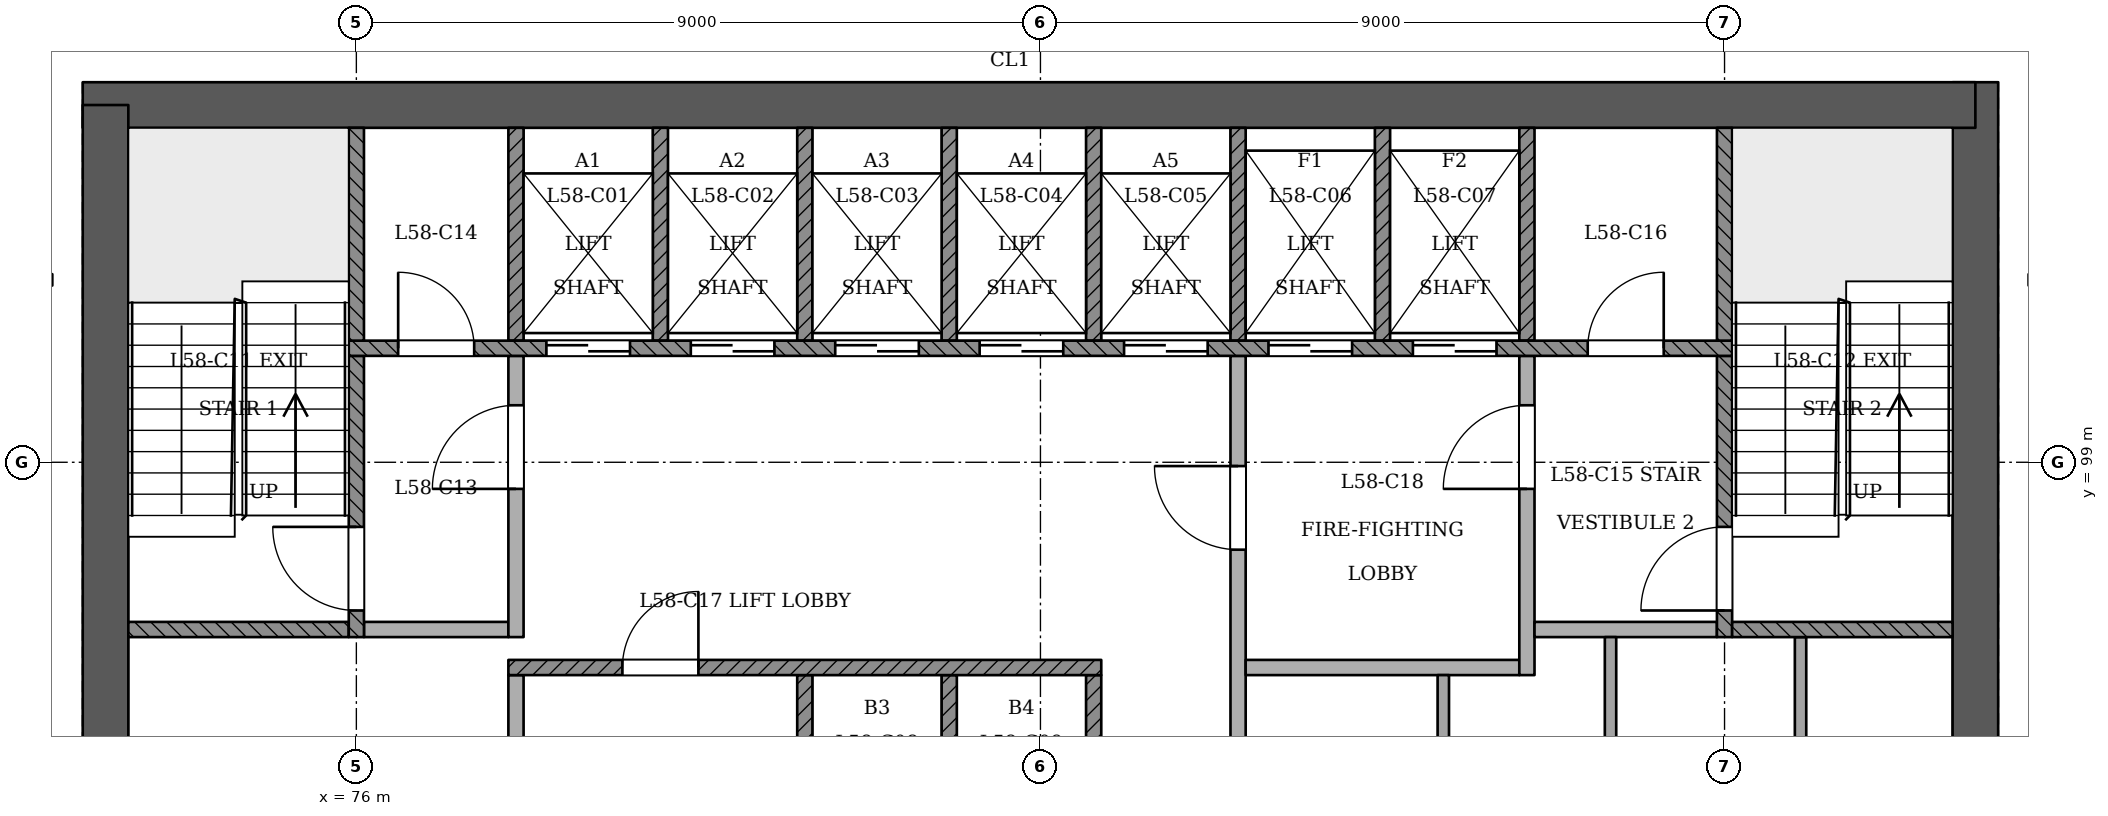
"""IFC4 building model, lengths in metres.
Left out: names, types, materials, properties, quantities, classifications, styles, units other than length and angle.
Written with IfcOpenShell. Run it as: python <this file> out.ifc"""

import sys

from ifc_helpers import new_model, si_unit, direction, frame, frame_2d, origin, place, context, subcontext, project, spatial, rectangle, extrude, element, fill, save


model = new_model("IFC4")
c1 = context("Model", 3, precision=1e-05, world=origin(), true_north=direction((0.0, 1.0)))
c2 = subcontext(c1, "Body", "Model", "MODEL_VIEW")
j1 = project(units=[si_unit("LENGTHUNIT", "METRE"), si_unit("PLANEANGLEUNIT", "RADIAN")], contexts=[c1])
p1 = place(None, origin())
s1 = spatial("IfcSite", under=j1, at=p1, CompositionType="ELEMENT")
p2 = place(p1, origin())
s2 = spatial("IfcBuilding", under=s1, at=p2, CompositionType="ELEMENT")
p3 = place(p2, frame((0.0, 0.0, 226.6)))
s3 = spatial("IfcBuildingStorey", under=s2, at=p3, CompositionType="ELEMENT", Elevation=226.6)
p4 = place(p3, frame((97.3, 93.1, 0.0), z_axis=(0.0, 0.0, 1.0), x_axis=(0.0, 1.0, 0.0)))
e1 = element("IfcWall", 1, at=p4, inside=s3, PredefinedType="SHEAR", context=c2, shape_type="SweptSolid", body=[
    extrude(rectangle(XDim=10.9, YDim=0.6, at=frame_2d((5.45, 0.0))), origin(), (0.0, 0.0, 1.0), 3.6),
])
p5 = place(p3, frame((97.3, 103.7, 0.0), z_axis=(0.0, 0.0, 1.0), x_axis=(-1.0, 0.0, 0.0)))
e2 = element("IfcWall", 2, at=p5, inside=s3, PredefinedType="SHEAR", context=c2, shape_type="SweptSolid", body=[
    extrude(rectangle(XDim=24.9, YDim=0.6, at=frame_2d((12.45, 0.0))), origin(), (0.0, 0.0, 1.0), 3.6),
])
p6 = place(p3, frame((72.7, 103.7, 0.0), z_axis=(0.0, 0.0, 1.0), x_axis=(0.0, -1.0, 0.0)))
e3 = element("IfcWall", 3, at=p6, inside=s3, PredefinedType="SHEAR", context=c2, shape_type="SweptSolid", body=[
    extrude(rectangle(XDim=10.9, YDim=0.6, at=frame_2d((5.45, 0.0))), origin(), (0.0, 0.0, 1.0), 3.6),
])
p7 = place(p3, frame((72.0, 101.4, 0.0), z_axis=(0.0, 0.0, 1.0), x_axis=(-1.0, 0.0, 0.0)))
e4 = element("IfcWall", 4, at=p7, inside=s3, PredefinedType="PARTITIONING", context=c2, shape_type="SweptSolid", body=[
    extrude(rectangle(XDim=1.8, YDim=0.15, at=frame_2d((0.9, 0.0))), origin(), (0.0, 0.0, 1.0), 3.2),
])
p8 = place(p3, frame((78.1, 93.4, 0.0), z_axis=(0.0, 0.0, 1.0), x_axis=(0.0, 1.0, 0.0)))
e5 = element("IfcWall", 5, at=p8, inside=s3, PredefinedType="PARTITIONING", context=c2, shape_type="SweptSolid", body=[
    extrude(rectangle(XDim=2.8, YDim=0.2, at=frame_2d((1.4, 0.0))), origin(), (0.0, 0.0, 1.0), 3.2),
])
for number, where, z_axis, x_axis in (
    (6, (81.9, 93.4, 0.0), (0.0, 0.0, 1.0), (0.0, 1.0, 0.0)),
    (7, (83.8, 93.4, 0.0), (0.0, 0.0, 1.0), (0.0, 1.0, 0.0)),
    (8, (85.7, 93.4, 0.0), (0.0, 0.0, 1.0), (0.0, 1.0, 0.0)),
):
    element("IfcWall", number, at=place(p3, frame(where, z_axis=z_axis, x_axis=x_axis)), inside=s3, PredefinedType="SOLIDWALL", context=c2, shape_type="SweptSolid", body=[
        extrude(rectangle(XDim=2.8, YDim=0.2, at=frame_2d((1.4, 0.0))), origin(), (0.0, 0.0, 1.0), 3.2),
    ])
p9 = place(p3, frame((87.6, 93.4, 0.0), z_axis=(0.0, 0.0, 1.0), x_axis=(0.0, 1.0, 0.0)))
e9 = element("IfcWall", 9, at=p9, inside=s3, PredefinedType="PARTITIONING", context=c2, shape_type="SweptSolid", body=[
    extrude(rectangle(XDim=7.0, YDim=0.2, at=frame_2d((3.5, 0.0))), origin(), (0.0, 0.0, 1.0), 3.2),
])
p10 = place(p9, frame((4.45, 0.0, 0.0)))
e10 = element("IfcOpeningElement", 10, at=p10, cuts=e9, PredefinedType="OPENING", context=c2, shape_type="SweptSolid", body=[
    extrude(rectangle(XDim=1.1, YDim=2.1, at=frame_2d((0.55, 1.05))), frame((0.0, 0.11, 0.0), z_axis=(0.0, -1.0, 0.0), x_axis=(1.0, 0.0, 0.0)), (0.0, 0.0, 1.0), 0.221),
])
p11 = place(p3, frame((90.3, 93.4, 0.0), z_axis=(0.0, 0.0, 1.0), x_axis=(0.0, 1.0, 0.0)))
e11 = element("IfcWall", 11, at=p11, inside=s3, PredefinedType="PARTITIONING", context=c2, shape_type="SweptSolid", body=[
    extrude(rectangle(XDim=2.8, YDim=0.15, at=frame_2d((1.4, 0.0))), origin(), (0.0, 0.0, 1.0), 3.2),
])
for number, where, z_axis, x_axis in (
    (12, (92.5, 93.4, 0.0), (0.0, 0.0, 1.0), (0.0, 1.0, 0.0)),
    (13, (95.0, 93.4, 0.0), (0.0, 0.0, 1.0), (0.0, 1.0, 0.0)),
):
    element("IfcWall", number, at=place(p3, frame(where, z_axis=z_axis, x_axis=x_axis)), inside=s3, PredefinedType="PARTITIONING", context=c2, shape_type="SweptSolid", body=[
        extrude(rectangle(XDim=3.3, YDim=0.15, at=frame_2d((1.65, 0.0))), origin(), (0.0, 0.0, 1.0), 3.2),
    ])
p12 = place(p3, frame((78.0, 96.3, 0.0), z_axis=(0.0, 0.0, 1.0), x_axis=(1.0, 0.0, 0.0)))
e14 = element("IfcWall", 14, at=p12, inside=s3, PredefinedType="SOLIDWALL", context=c2, shape_type="SweptSolid", body=[
    extrude(rectangle(XDim=7.8, YDim=0.2, at=frame_2d((3.9, 0.0))), origin(), (0.0, 0.0, 1.0), 3.2),
])
p13 = place(p12, frame((1.5, 0.0, 0.0)))
e15 = element("IfcOpeningElement", 15, at=p13, cuts=e14, PredefinedType="OPENING", context=c2, shape_type="SweptSolid", body=[
    extrude(rectangle(XDim=1.0, YDim=2.1, at=frame_2d((0.5, 1.05))), frame((0.0, 0.11, 0.0), z_axis=(0.0, -1.0, 0.0), x_axis=(1.0, 0.0, 0.0)), (0.0, 0.0, 1.0), 0.221),
])
p14 = place(p3, frame((87.7, 96.3, 0.0), z_axis=(0.0, 0.0, 1.0), x_axis=(1.0, 0.0, 0.0)))
e16 = element("IfcWall", 16, at=p14, inside=s3, PredefinedType="PARTITIONING", context=c2, shape_type="SweptSolid", body=[
    extrude(rectangle(XDim=3.6, YDim=0.2, at=frame_2d((1.8, 0.0))), origin(), (0.0, 0.0, 1.0), 3.2),
])
p15 = place(p3, frame((91.4, 96.2, 0.0), z_axis=(0.0, 0.0, 1.0), x_axis=(0.0, 1.0, 0.0)))
e17 = element("IfcWall", 17, at=p15, inside=s3, PredefinedType="PARTITIONING", context=c2, shape_type="SweptSolid", body=[
    extrude(rectangle(XDim=4.2, YDim=0.2, at=frame_2d((2.1, 0.0))), origin(), (0.0, 0.0, 1.0), 3.2),
])
p16 = place(p15, frame((2.45, 0.0, 0.0)))
e18 = element("IfcOpeningElement", 18, at=p16, cuts=e17, PredefinedType="OPENING", context=c2, shape_type="SweptSolid", body=[
    extrude(rectangle(XDim=1.1, YDim=2.1, at=frame_2d((0.55, 1.05))), frame((0.0, 0.11, 0.0), z_axis=(0.0, -1.0, 0.0), x_axis=(1.0, 0.0, 0.0)), (0.0, 0.0, 1.0), 0.221),
])
p17 = place(p3, frame((73.0, 96.8, 0.0), z_axis=(0.0, 0.0, 1.0), x_axis=(1.0, 0.0, 0.0)))
e19 = element("IfcWall", 19, at=p17, inside=s3, PredefinedType="SOLIDWALL", context=c2, shape_type="SweptSolid", body=[
    extrude(rectangle(XDim=2.9, YDim=0.2, at=frame_2d((1.45, 0.0))), origin(), (0.0, 0.0, 1.0), 3.2),
])
p18 = place(p3, frame((76.0, 96.7, 0.0), z_axis=(0.0, 0.0, 1.0), x_axis=(0.0, 1.0, 0.0)))
e20 = element("IfcWall", 20, at=p18, inside=s3, PredefinedType="SOLIDWALL", context=c2, shape_type="SweptSolid", body=[
    extrude(rectangle(XDim=3.7, YDim=0.2, at=frame_2d((1.85, 0.0))), origin(), (0.0, 0.0, 1.0), 3.2),
])
p19 = place(p18, frame((0.35, 0.0, 0.0)))
e21 = element("IfcOpeningElement", 21, at=p19, cuts=e20, PredefinedType="OPENING", context=c2, shape_type="SweptSolid", body=[
    extrude(rectangle(XDim=1.1, YDim=2.1, at=frame_2d((0.55, 1.05))), frame((0.0, 0.11, 0.0), z_axis=(0.0, -1.0, 0.0), x_axis=(1.0, 0.0, 0.0)), (0.0, 0.0, 1.0), 0.221),
])
p20 = place(p3, frame((76.1, 96.8, 0.0), z_axis=(0.0, 0.0, 1.0), x_axis=(1.0, 0.0, 0.0)))
e22 = element("IfcWall", 22, at=p20, inside=s3, PredefinedType="PARTITIONING", context=c2, shape_type="SweptSolid", body=[
    extrude(rectangle(XDim=1.9, YDim=0.2, at=frame_2d((0.95, 0.0))), origin(), (0.0, 0.0, 1.0), 3.2),
])
p21 = place(p3, frame((78.1, 96.7, 0.0), z_axis=(0.0, 0.0, 1.0), x_axis=(0.0, 1.0, 0.0)))
e23 = element("IfcWall", 23, at=p21, inside=s3, PredefinedType="PARTITIONING", context=c2, shape_type="SweptSolid", body=[
    extrude(rectangle(XDim=3.7, YDim=0.2, at=frame_2d((1.85, 0.0))), origin(), (0.0, 0.0, 1.0), 3.2),
])
p22 = place(p21, frame((1.95, 0.0, 0.0)))
e24 = element("IfcOpeningElement", 24, at=p22, cuts=e23, PredefinedType="OPENING", context=c2, shape_type="SweptSolid", body=[
    extrude(rectangle(XDim=1.1, YDim=2.1, at=frame_2d((0.55, 1.05))), frame((0.0, 0.11, 0.0), z_axis=(0.0, -1.0, 0.0), x_axis=(1.0, 0.0, 0.0)), (0.0, 0.0, 1.0), 0.221),
])
p23 = place(p3, frame((91.5, 96.8, 0.0), z_axis=(0.0, 0.0, 1.0), x_axis=(1.0, 0.0, 0.0)))
e25 = element("IfcWall", 25, at=p23, inside=s3, PredefinedType="PARTITIONING", context=c2, shape_type="SweptSolid", body=[
    extrude(rectangle(XDim=2.4, YDim=0.2, at=frame_2d((1.2, 0.0))), origin(), (0.0, 0.0, 1.0), 3.2),
])
p24 = place(p3, frame((94.0, 96.7, 0.0), z_axis=(0.0, 0.0, 1.0), x_axis=(0.0, 1.0, 0.0)))
e26 = element("IfcWall", 26, at=p24, inside=s3, PredefinedType="SOLIDWALL", context=c2, shape_type="SweptSolid", body=[
    extrude(rectangle(XDim=3.7, YDim=0.2, at=frame_2d((1.85, 0.0))), origin(), (0.0, 0.0, 1.0), 3.2),
])
p25 = place(p24, frame((0.35, 0.0, 0.0)))
e27 = element("IfcOpeningElement", 27, at=p25, cuts=e26, PredefinedType="OPENING", context=c2, shape_type="SweptSolid", body=[
    extrude(rectangle(XDim=1.1, YDim=2.1, at=frame_2d((0.55, 1.05))), frame((0.0, 0.11, 0.0), z_axis=(0.0, -1.0, 0.0), x_axis=(1.0, 0.0, 0.0)), (0.0, 0.0, 1.0), 0.221),
])
p26 = place(p3, frame((94.1, 96.8, 0.0), z_axis=(0.0, 0.0, 1.0), x_axis=(1.0, 0.0, 0.0)))
e28 = element("IfcWall", 28, at=p26, inside=s3, PredefinedType="SOLIDWALL", context=c2, shape_type="SweptSolid", body=[
    extrude(rectangle(XDim=2.9, YDim=0.2, at=frame_2d((1.45, 0.0))), origin(), (0.0, 0.0, 1.0), 3.2),
])
p27 = place(p3, frame((75.9, 100.5, 0.0), z_axis=(0.0, 0.0, 1.0), x_axis=(1.0, 0.0, 0.0)))
e29 = element("IfcWall", 29, at=p27, inside=s3, PredefinedType="SOLIDWALL", context=c2, shape_type="SweptSolid", body=[
    extrude(rectangle(XDim=18.2, YDim=0.2, at=frame_2d((9.1, 0.0))), origin(), (0.0, 0.0, 1.0), 3.2),
])
p28 = place(p27, frame((2.6, 0.0, 0.0)))
e30 = element("IfcOpeningElement", 30, at=p28, cuts=e29, PredefinedType="OPENING", context=c2, shape_type="SweptSolid", body=[
    extrude(rectangle(XDim=1.1, YDim=2.1, at=frame_2d((0.55, 1.05))), frame((0.0, 0.11, 0.0), z_axis=(0.0, -1.0, 0.0), x_axis=(1.0, 0.0, 0.0)), (0.0, 0.0, 1.0), 0.221),
])
p29 = place(p27, frame((4.5, 0.0, 0.0)))
e31 = element("IfcOpeningElement", 31, at=p29, cuts=e29, PredefinedType="OPENING", context=c2, shape_type="SweptSolid", body=[
    extrude(rectangle(XDim=1.1, YDim=2.1, at=frame_2d((0.55, 1.05))), frame((0.0, 0.11, 0.0), z_axis=(0.0, -1.0, 0.0), x_axis=(1.0, 0.0, 0.0)), (0.0, 0.0, 1.0), 0.221),
])
p30 = place(p27, frame((6.4, 0.0, 0.0)))
e32 = element("IfcOpeningElement", 32, at=p30, cuts=e29, PredefinedType="OPENING", context=c2, shape_type="SweptSolid", body=[
    extrude(rectangle(XDim=1.1, YDim=2.1, at=frame_2d((0.55, 1.05))), frame((0.0, 0.11, 0.0), z_axis=(0.0, -1.0, 0.0), x_axis=(1.0, 0.0, 0.0)), (0.0, 0.0, 1.0), 0.221),
])
p31 = place(p27, frame((8.3, 0.0, 0.0)))
e33 = element("IfcOpeningElement", 33, at=p31, cuts=e29, PredefinedType="OPENING", context=c2, shape_type="SweptSolid", body=[
    extrude(rectangle(XDim=1.1, YDim=2.1, at=frame_2d((0.55, 1.05))), frame((0.0, 0.11, 0.0), z_axis=(0.0, -1.0, 0.0), x_axis=(1.0, 0.0, 0.0)), (0.0, 0.0, 1.0), 0.221),
])
p32 = place(p27, frame((10.2, 0.0, 0.0)))
e34 = element("IfcOpeningElement", 34, at=p32, cuts=e29, PredefinedType="OPENING", context=c2, shape_type="SweptSolid", body=[
    extrude(rectangle(XDim=1.1, YDim=2.1, at=frame_2d((0.55, 1.05))), frame((0.0, 0.11, 0.0), z_axis=(0.0, -1.0, 0.0), x_axis=(1.0, 0.0, 0.0)), (0.0, 0.0, 1.0), 0.221),
])
p33 = place(p27, frame((12.1, 0.0, 0.0)))
e35 = element("IfcOpeningElement", 35, at=p33, cuts=e29, PredefinedType="OPENING", context=c2, shape_type="SweptSolid", body=[
    extrude(rectangle(XDim=1.1, YDim=2.1, at=frame_2d((0.55, 1.05))), frame((0.0, 0.11, 0.0), z_axis=(0.0, -1.0, 0.0), x_axis=(1.0, 0.0, 0.0)), (0.0, 0.0, 1.0), 0.221),
])
p34 = place(p27, frame((14.0, 0.0, 0.0)))
e36 = element("IfcOpeningElement", 36, at=p34, cuts=e29, PredefinedType="OPENING", context=c2, shape_type="SweptSolid", body=[
    extrude(rectangle(XDim=1.1, YDim=2.1, at=frame_2d((0.55, 1.05))), frame((0.0, 0.11, 0.0), z_axis=(0.0, -1.0, 0.0), x_axis=(1.0, 0.0, 0.0)), (0.0, 0.0, 1.0), 0.221),
])
p35 = place(p27, frame((0.65, 0.0, 0.0)))
e37 = element("IfcOpeningElement", 37, at=p35, cuts=e29, PredefinedType="OPENING", context=c2, shape_type="SweptSolid", body=[
    extrude(rectangle(XDim=1.0, YDim=2.1, at=frame_2d((0.5, 1.05))), frame((0.0, 0.11, 0.0), z_axis=(0.0, -1.0, 0.0), x_axis=(1.0, 0.0, 0.0)), (0.0, 0.0, 1.0), 0.221),
])
p36 = place(p27, frame((16.3, 0.0, 0.0)))
e38 = element("IfcOpeningElement", 38, at=p36, cuts=e29, PredefinedType="OPENING", context=c2, shape_type="SweptSolid", body=[
    extrude(rectangle(XDim=1.0, YDim=2.1, at=frame_2d((0.5, 1.05))), frame((0.0, 0.11, 0.0), z_axis=(0.0, -1.0, 0.0), x_axis=(1.0, 0.0, 0.0)), (0.0, 0.0, 1.0), 0.221),
])
for number, where, z_axis, x_axis in (
    (39, (76.0, 100.6, 0.0), (0.0, 0.0, 1.0), (0.0, 1.0, 0.0)),
    (40, (78.1, 100.6, 0.0), (0.0, 0.0, 1.0), (0.0, 1.0, 0.0)),
    (41, (80.0, 100.6, 0.0), (0.0, 0.0, 1.0), (0.0, 1.0, 0.0)),
    (42, (81.9, 100.6, 0.0), (0.0, 0.0, 1.0), (0.0, 1.0, 0.0)),
    (43, (83.8, 100.6, 0.0), (0.0, 0.0, 1.0), (0.0, 1.0, 0.0)),
    (44, (85.7, 100.6, 0.0), (0.0, 0.0, 1.0), (0.0, 1.0, 0.0)),
    (45, (87.6, 100.6, 0.0), (0.0, 0.0, 1.0), (0.0, 1.0, 0.0)),
    (46, (89.5, 100.6, 0.0), (0.0, 0.0, 1.0), (0.0, 1.0, 0.0)),
    (47, (91.4, 100.6, 0.0), (0.0, 0.0, 1.0), (0.0, 1.0, 0.0)),
    (48, (94.0, 100.6, 0.0), (0.0, 0.0, 1.0), (0.0, 1.0, 0.0)),
):
    element("IfcWall", number, at=place(p3, frame(where, z_axis=z_axis, x_axis=x_axis)), inside=s3, PredefinedType="SOLIDWALL", context=c2, shape_type="SweptSolid", body=[
        extrude(rectangle(XDim=2.8, YDim=0.2, at=frame_2d((1.4, 0.0))), origin(), (0.0, 0.0, 1.0), 3.2),
    ])
p37 = place(p28, origin())
e49 = element("IfcDoor", 49, at=p37, inside=s3, OperationType="SLIDING_TO_RIGHT", PredefinedType="NOTDEFINED", context=c2, shape_type="SweptSolid", body=[
    extrude(rectangle(XDim=1.1, YDim=2.1, at=frame_2d((0.55, 1.05))), frame((0.0, 0.025, 0.0), z_axis=(0.0, -1.0, 0.0), x_axis=(1.0, 0.0, 0.0)), (0.0, 0.0, 1.0), 0.05),
])
fill(e30, e49)
p38 = place(p29, origin())
e50 = element("IfcDoor", 50, at=p38, inside=s3, OperationType="SLIDING_TO_LEFT", PredefinedType="NOTDEFINED", context=c2, shape_type="SweptSolid", body=[
    extrude(rectangle(XDim=1.1, YDim=2.1, at=frame_2d((0.55, 1.05))), frame((0.0, 0.025, 0.0), z_axis=(0.0, -1.0, 0.0), x_axis=(1.0, 0.0, 0.0)), (0.0, 0.0, 1.0), 0.05),
])
fill(e31, e50)
p39 = place(p30, origin())
e51 = element("IfcDoor", 51, at=p39, inside=s3, OperationType="SLIDING_TO_RIGHT", PredefinedType="NOTDEFINED", context=c2, shape_type="SweptSolid", body=[
    extrude(rectangle(XDim=1.1, YDim=2.1, at=frame_2d((0.55, 1.05))), frame((0.0, 0.025, 0.0), z_axis=(0.0, -1.0, 0.0), x_axis=(1.0, 0.0, 0.0)), (0.0, 0.0, 1.0), 0.05),
])
fill(e32, e51)
p40 = place(p31, origin())
e52 = element("IfcDoor", 52, at=p40, inside=s3, OperationType="SLIDING_TO_LEFT", PredefinedType="NOTDEFINED", context=c2, shape_type="SweptSolid", body=[
    extrude(rectangle(XDim=1.1, YDim=2.1, at=frame_2d((0.55, 1.05))), frame((0.0, 0.025, 0.0), z_axis=(0.0, -1.0, 0.0), x_axis=(1.0, 0.0, 0.0)), (0.0, 0.0, 1.0), 0.05),
])
fill(e33, e52)
p41 = place(p32, origin())
e53 = element("IfcDoor", 53, at=p41, inside=s3, OperationType="SLIDING_TO_RIGHT", PredefinedType="NOTDEFINED", context=c2, shape_type="SweptSolid", body=[
    extrude(rectangle(XDim=1.1, YDim=2.1, at=frame_2d((0.55, 1.05))), frame((0.0, 0.025, 0.0), z_axis=(0.0, -1.0, 0.0), x_axis=(1.0, 0.0, 0.0)), (0.0, 0.0, 1.0), 0.05),
])
fill(e34, e53)
p42 = place(p33, origin())
e54 = element("IfcDoor", 54, at=p42, inside=s3, OperationType="SLIDING_TO_RIGHT", PredefinedType="NOTDEFINED", context=c2, shape_type="SweptSolid", body=[
    extrude(rectangle(XDim=1.1, YDim=2.1, at=frame_2d((0.55, 1.05))), frame((0.0, 0.025, 0.0), z_axis=(0.0, -1.0, 0.0), x_axis=(1.0, 0.0, 0.0)), (0.0, 0.0, 1.0), 0.05),
])
fill(e35, e54)
p43 = place(p34, origin())
e55 = element("IfcDoor", 55, at=p43, inside=s3, OperationType="SLIDING_TO_LEFT", PredefinedType="NOTDEFINED", context=c2, shape_type="SweptSolid", body=[
    extrude(rectangle(XDim=1.1, YDim=2.1, at=frame_2d((0.55, 1.05))), frame((0.0, 0.025, 0.0), z_axis=(0.0, -1.0, 0.0), x_axis=(1.0, 0.0, 0.0)), (0.0, 0.0, 1.0), 0.05),
])
fill(e36, e55)
p44 = place(p19, origin())
e56 = element("IfcDoor", 56, at=p44, inside=s3, OperationType="SINGLE_SWING_RIGHT", PredefinedType="NOTDEFINED", context=c2, shape_type="SweptSolid", body=[
    extrude(rectangle(XDim=1.1, YDim=2.1, at=frame_2d((0.55, 1.05))), frame((0.0, 0.025, 0.0), z_axis=(0.0, -1.0, 0.0), x_axis=(1.0, 0.0, 0.0)), (0.0, 0.0, 1.0), 0.05),
])
fill(e21, e56)
p45 = place(p25, origin())
e57 = element("IfcDoor", 57, at=p45, inside=s3, OperationType="SINGLE_SWING_LEFT", PredefinedType="NOTDEFINED", context=c2, shape_type="SweptSolid", body=[
    extrude(rectangle(XDim=1.1, YDim=2.1, at=frame_2d((0.55, 1.05))), frame((0.0, 0.025, 0.0), z_axis=(0.0, -1.0, 0.0), x_axis=(1.0, 0.0, 0.0)), (0.0, 0.0, 1.0), 0.05),
])
fill(e27, e57)
p46 = place(p22, origin())
e58 = element("IfcDoor", 58, at=p46, inside=s3, OperationType="SINGLE_SWING_LEFT", PredefinedType="NOTDEFINED", context=c2, shape_type="SweptSolid", body=[
    extrude(rectangle(XDim=1.1, YDim=2.1, at=frame_2d((0.55, 1.05))), frame((0.0, 0.025, 0.0), z_axis=(0.0, -1.0, 0.0), x_axis=(1.0, 0.0, 0.0)), (0.0, 0.0, 1.0), 0.05),
])
fill(e24, e58)
p47 = place(p10, origin())
e59 = element("IfcDoor", 59, at=p47, inside=s3, OperationType="SINGLE_SWING_RIGHT", PredefinedType="NOTDEFINED", context=c2, shape_type="SweptSolid", body=[
    extrude(rectangle(XDim=1.1, YDim=2.1, at=frame_2d((0.55, 1.05))), frame((0.0, 0.025, 0.0), z_axis=(0.0, -1.0, 0.0), x_axis=(1.0, 0.0, 0.0)), (0.0, 0.0, 1.0), 0.05),
])
fill(e10, e59)
p48 = place(p16, origin())
e60 = element("IfcDoor", 60, at=p48, inside=s3, OperationType="SINGLE_SWING_LEFT", PredefinedType="NOTDEFINED", context=c2, shape_type="SweptSolid", body=[
    extrude(rectangle(XDim=1.1, YDim=2.1, at=frame_2d((0.55, 1.05))), frame((0.0, 0.025, 0.0), z_axis=(0.0, -1.0, 0.0), x_axis=(1.0, 0.0, 0.0)), (0.0, 0.0, 1.0), 0.05),
])
fill(e18, e60)
p49 = place(p35, origin())
e61 = element("IfcDoor", 61, at=p49, inside=s3, OperationType="SINGLE_SWING_LEFT", PredefinedType="NOTDEFINED", context=c2, shape_type="SweptSolid", body=[
    extrude(rectangle(XDim=1.0, YDim=2.1, at=frame_2d((0.5, 1.05))), frame((0.0, 0.025, 0.0), z_axis=(0.0, -1.0, 0.0), x_axis=(1.0, 0.0, 0.0)), (0.0, 0.0, 1.0), 0.05),
])
fill(e37, e61)
p50 = place(p36, origin())
e62 = element("IfcDoor", 62, at=p50, inside=s3, OperationType="SINGLE_SWING_RIGHT", PredefinedType="NOTDEFINED", context=c2, shape_type="SweptSolid", body=[
    extrude(rectangle(XDim=1.0, YDim=2.1, at=frame_2d((0.5, 1.05))), frame((0.0, 0.025, 0.0), z_axis=(0.0, -1.0, 0.0), x_axis=(1.0, 0.0, 0.0)), (0.0, 0.0, 1.0), 0.05),
])
fill(e38, e62)
p51 = place(p13, origin())
e63 = element("IfcDoor", 63, at=p51, inside=s3, OperationType="SINGLE_SWING_RIGHT", PredefinedType="NOTDEFINED", context=c2, shape_type="SweptSolid", body=[
    extrude(rectangle(XDim=1.0, YDim=2.1, at=frame_2d((0.5, 1.05))), frame((0.0, 0.025, 0.0), z_axis=(0.0, -1.0, 0.0), x_axis=(1.0, 0.0, 0.0)), (0.0, 0.0, 1.0), 0.05),
])
fill(e15, e63)
save(model, sys.argv[1])
